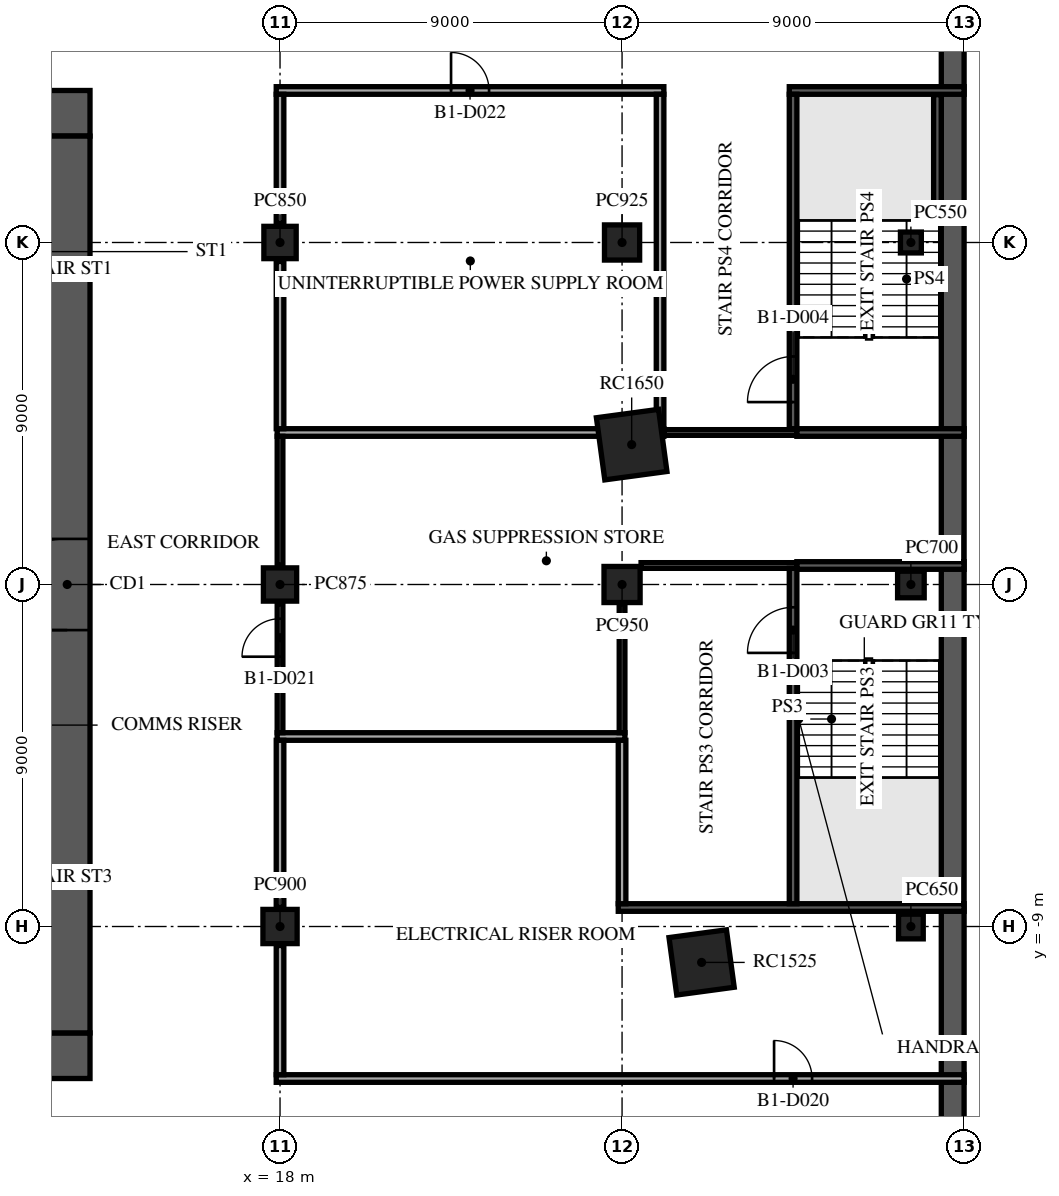
"""IFC4 building model, lengths in metres.
Left out: names, types, materials, properties, quantities, classifications, styles, units other than length and angle.
Written with IfcOpenShell. Run it as: python <this file> out.ifc"""

import sys

from ifc_helpers import new_model, si_unit, direction, frame, frame_2d, origin, origin_2d, place, context, subcontext, project, spatial, rectangle, extrude, element, fill, save


model = new_model("IFC4")
c1 = context("Model", 3, precision=1e-05, world=origin(), true_north=direction((0.0, 1.0)))
c2 = subcontext(c1, "Body", "Model", "MODEL_VIEW")
j1 = project(units=[si_unit("LENGTHUNIT", "METRE"), si_unit("PLANEANGLEUNIT", "RADIAN")], contexts=[c1])
p1 = place(None, origin())
s1 = spatial("IfcSite", under=j1, at=p1, CompositionType="ELEMENT")
p2 = place(p1, origin())
s2 = spatial("IfcBuilding", under=s1, at=p2, CompositionType="ELEMENT")
p3 = place(p2, frame((0.0, 0.0, -4.5)))
s3 = spatial("IfcBuildingStorey", under=s2, at=p3, CompositionType="ELEMENT", Elevation=-4.5)
p4 = place(p3, frame((35.7, -31.0, -0.3), z_axis=(0.0, 0.0, 1.0), x_axis=(0.0, 1.0, 0.0)))
e1 = element("IfcWall", 1, at=p4, inside=s3, PredefinedType="SOLIDWALL", context=c2, shape_type="SweptSolid", body=[
    extrude(rectangle(XDim=62.0, YDim=0.6, at=frame_2d((31.0, 0.0))), origin(), (0.0, 0.0, 1.0), 4.4),
])
p5 = place(p3, frame((18.0, -9.0, 0.0), z_axis=(0.0, 0.0, 1.0), x_axis=(1.0, 0.0, 0.0)))
e2 = element("IfcColumn", 2, at=p5, inside=s3, PredefinedType="COLUMN", context=c2, shape_type="SweptSolid", body=[
    extrude(rectangle(XDim=0.9, YDim=0.9, at=origin_2d()), origin(), (0.0, 0.0, 1.0), 4.5),
])
p6 = place(p3, frame((18.0, 0.0, 0.0), z_axis=(0.0, 0.0, 1.0), x_axis=(1.0, 0.0, 0.0)))
e3 = element("IfcColumn", 3, at=p6, inside=s3, PredefinedType="COLUMN", context=c2, shape_type="SweptSolid", body=[
    extrude(rectangle(XDim=0.875, YDim=0.875, at=origin_2d()), origin(), (0.0, 0.0, 1.0), 4.5),
])
p7 = place(p3, frame((18.0, 9.0, 0.0), z_axis=(0.0, 0.0, 1.0), x_axis=(1.0, 0.0, 0.0)))
e4 = element("IfcColumn", 4, at=p7, inside=s3, PredefinedType="COLUMN", context=c2, shape_type="SweptSolid", body=[
    extrude(rectangle(XDim=0.85, YDim=0.85, at=origin_2d()), origin(), (0.0, 0.0, 1.0), 4.5),
])
p8 = place(p3, frame((27.0, 0.0, 0.0), z_axis=(0.0, 0.0, 1.0), x_axis=(1.0, 0.0, 0.0)))
e5 = element("IfcColumn", 5, at=p8, inside=s3, PredefinedType="COLUMN", context=c2, shape_type="SweptSolid", body=[
    extrude(rectangle(XDim=0.95, YDim=0.95, at=origin_2d()), origin(), (0.0, 0.0, 1.0), 4.5),
])
p9 = place(p3, frame((27.0, 9.0, 0.0), z_axis=(0.0, 0.0, 1.0), x_axis=(1.0, 0.0, 0.0)))
e6 = element("IfcColumn", 6, at=p9, inside=s3, PredefinedType="COLUMN", context=c2, shape_type="SweptSolid", body=[
    extrude(rectangle(XDim=0.925, YDim=0.925, at=origin_2d()), origin(), (0.0, 0.0, 1.0), 4.5),
])
p10 = place(p3, frame((34.6, -9.0, 0.0), z_axis=(0.0, 0.0, 1.0), x_axis=(1.0, 0.0, 0.0)))
e7 = element("IfcColumn", 7, at=p10, inside=s3, PredefinedType="COLUMN", context=c2, shape_type="SweptSolid", body=[
    extrude(rectangle(XDim=0.65, YDim=0.65, at=origin_2d()), origin(), (0.0, 0.0, 1.0), 4.5),
])
p11 = place(p3, frame((34.6, 0.0, 0.0), z_axis=(0.0, 0.0, 1.0), x_axis=(1.0, 0.0, 0.0)))
e8 = element("IfcColumn", 8, at=p11, inside=s3, PredefinedType="COLUMN", context=c2, shape_type="SweptSolid", body=[
    extrude(rectangle(XDim=0.7, YDim=0.7, at=origin_2d()), origin(), (0.0, 0.0, 1.0), 4.5),
])
p12 = place(p3, frame((34.6, 9.0, 0.0), z_axis=(0.0, 0.0, 1.0), x_axis=(1.0, 0.0, 0.0)))
e9 = element("IfcColumn", 9, at=p12, inside=s3, PredefinedType="COLUMN", context=c2, shape_type="SweptSolid", body=[
    extrude(rectangle(XDim=0.55, YDim=0.55, at=origin_2d()), origin(), (0.0, 0.0, 1.0), 4.5),
])
p13 = place(p3, frame((29.093, -9.945, 0.0), z_axis=(0.0, 0.0, 1.0), x_axis=(0.991001197216, 0.133853005627, 0.0)))
e10 = element("IfcColumn", 10, at=p13, inside=s3, PredefinedType="COLUMN", context=c2, shape_type="SweptSolid", body=[
    extrude(rectangle(XDim=1.525, YDim=1.525, at=origin_2d()), origin(), (0.0, 0.0, 1.0), 4.5),
])
p14 = place(p3, frame((27.253, 3.681, 0.0), z_axis=(0.0, 0.0, 1.0), x_axis=(0.991001197216, 0.133853005627, 0.0)))
e11 = element("IfcColumn", 11, at=p14, inside=s3, PredefinedType="COLUMN", context=c2, shape_type="SweptSolid", body=[
    extrude(rectangle(XDim=1.65, YDim=1.65, at=origin_2d()), origin(), (0.0, 0.0, 1.0), 4.5),
])
p15 = place(p3, frame((-13.0, 12.4, 0.0), z_axis=(0.0, 0.0, 1.0), x_axis=(1.0, 0.0, 0.0)))
e12 = element("IfcWall", 12, at=p15, inside=s3, PredefinedType="SHEAR", context=c2, shape_type="SweptSolid", body=[
    extrude(rectangle(XDim=26.0, YDim=1.2, at=frame_2d((13.0, 0.0))), origin(), (0.0, 0.0, 1.0), 4.1),
])
p16 = place(p15, frame((11.8, 0.0, 0.0)))
e13 = element("IfcOpeningElement", 13, at=p16, cuts=e12, PredefinedType="OPENING", context=c2, shape_type="SweptSolid", body=[
    extrude(rectangle(XDim=2.4, YDim=2.4, at=frame_2d((1.2, 1.2))), frame((0.0, 0.61, 0.0), z_axis=(0.0, -1.0, 0.0), x_axis=(1.0, 0.0, 0.0)), (0.0, 0.0, 1.0), 1.22),
])
p17 = place(p15, frame((22.625, 0.0, 0.0)))
e14 = element("IfcOpeningElement", 14, at=p17, cuts=e12, PredefinedType="OPENING", context=c2, shape_type="SweptSolid", body=[
    extrude(rectangle(XDim=1.2, YDim=2.1, at=frame_2d((0.6, 1.05))), frame((0.0, 0.61, 0.0), z_axis=(0.0, -1.0, 0.0), x_axis=(1.0, 0.0, 0.0)), (0.0, 0.0, 1.0), 1.22),
])
p18 = place(p15, frame((1.6, 0.0, 0.0)))
e15 = element("IfcOpeningElement", 15, at=p18, cuts=e12, PredefinedType="OPENING", context=c2, shape_type="SweptSolid", body=[
    extrude(rectangle(XDim=1.0, YDim=2.1, at=frame_2d((0.5, 1.05))), frame((0.0, 0.61, 0.0), z_axis=(0.0, -1.0, 0.0), x_axis=(1.0, 0.0, 0.0)), (0.0, 0.0, 1.0), 1.22),
])
p19 = place(p3, frame((-13.0, -12.4, 0.0), z_axis=(0.0, 0.0, 1.0), x_axis=(1.0, 0.0, 0.0)))
e16 = element("IfcWall", 16, at=p19, inside=s3, PredefinedType="SHEAR", context=c2, shape_type="SweptSolid", body=[
    extrude(rectangle(XDim=26.0, YDim=1.2, at=frame_2d((13.0, 0.0))), origin(), (0.0, 0.0, 1.0), 4.1),
])
p20 = place(p19, frame((7.9, 0.0, 0.0)))
e17 = element("IfcOpeningElement", 17, at=p20, cuts=e16, PredefinedType="OPENING", context=c2, shape_type="SweptSolid", body=[
    extrude(rectangle(XDim=2.0, YDim=2.1, at=frame_2d((1.0, 1.05))), frame((0.0, 0.61, 0.0), z_axis=(0.0, -1.0, 0.0), x_axis=(1.0, 0.0, 0.0)), (0.0, 0.0, 1.0), 1.22),
])
p21 = place(p19, frame((18.025, 0.0, 0.0)))
e18 = element("IfcOpeningElement", 18, at=p21, cuts=e16, PredefinedType="OPENING", context=c2, shape_type="SweptSolid", body=[
    extrude(rectangle(XDim=1.2, YDim=2.1, at=frame_2d((0.6, 1.05))), frame((0.0, 0.61, 0.0), z_axis=(0.0, -1.0, 0.0), x_axis=(1.0, 0.0, 0.0)), (0.0, 0.0, 1.0), 1.22),
])
p22 = place(p19, frame((2.175, 0.0, 0.0)))
e19 = element("IfcOpeningElement", 19, at=p22, cuts=e16, PredefinedType="OPENING", context=c2, shape_type="SweptSolid", body=[
    extrude(rectangle(XDim=1.2, YDim=2.1, at=frame_2d((0.6, 1.05))), frame((0.0, 0.61, 0.0), z_axis=(0.0, -1.0, 0.0), x_axis=(1.0, 0.0, 0.0)), (0.0, 0.0, 1.0), 1.22),
])
p23 = place(p19, frame((22.625, 0.0, 0.0)))
e20 = element("IfcOpeningElement", 20, at=p23, cuts=e16, PredefinedType="OPENING", context=c2, shape_type="SweptSolid", body=[
    extrude(rectangle(XDim=1.2, YDim=2.1, at=frame_2d((0.6, 1.05))), frame((0.0, 0.61, 0.0), z_axis=(0.0, -1.0, 0.0), x_axis=(1.0, 0.0, 0.0)), (0.0, 0.0, 1.0), 1.22),
])
p24 = place(p3, frame((12.4, -11.8, 0.0), z_axis=(0.0, 0.0, 1.0), x_axis=(0.0, 1.0, 0.0)))
e21 = element("IfcWall", 21, at=p24, inside=s3, PredefinedType="SHEAR", context=c2, shape_type="SweptSolid", body=[
    extrude(rectangle(XDim=23.6, YDim=1.2, at=frame_2d((11.8, 0.0))), origin(), (0.0, 0.0, 1.0), 4.1),
])
p25 = place(p24, frame((10.6, 0.0, 0.0)))
e22 = element("IfcOpeningElement", 22, at=p25, cuts=e21, PredefinedType="OPENING", context=c2, shape_type="SweptSolid", body=[
    extrude(rectangle(XDim=2.4, YDim=2.4, at=frame_2d((1.2, 1.2))), frame((0.0, 0.61, 0.0), z_axis=(0.0, -1.0, 0.0), x_axis=(1.0, 0.0, 0.0)), (0.0, 0.0, 1.0), 1.22),
])
p26 = place(p3, frame((17.9, -13.0, 0.0), z_axis=(0.0, 0.0, 1.0), x_axis=(1.0, 0.0, 0.0)))
e23 = element("IfcWall", 23, at=p26, inside=s3, PredefinedType="PARTITIONING", context=c2, shape_type="SweptSolid", body=[
    extrude(rectangle(XDim=18.1, YDim=0.2, at=frame_2d((9.05, 0.0))), origin(), (0.0, 0.0, 1.0), 4.1),
])
p27 = place(p26, frame((13.1, 0.0, 0.0)))
e24 = element("IfcOpeningElement", 24, at=p27, cuts=e23, PredefinedType="OPENING", context=c2, shape_type="SweptSolid", body=[
    extrude(rectangle(XDim=1.0, YDim=2.1, at=frame_2d((0.5, 1.05))), frame((0.0, 0.11, 0.0), z_axis=(0.0, -1.0, 0.0), x_axis=(1.0, 0.0, 0.0)), (0.0, 0.0, 1.0), 0.22),
])
p28 = place(p3, frame((26.9, -8.5, 0.0), z_axis=(0.0, 0.0, 1.0), x_axis=(1.0, 0.0, 0.0)))
e25 = element("IfcWall", 25, at=p28, inside=s3, PredefinedType="PARTITIONING", context=c2, shape_type="SweptSolid", body=[
    extrude(rectangle(XDim=9.1, YDim=0.2, at=frame_2d((4.55, 0.0))), origin(), (0.0, 0.0, 1.0), 4.1),
])
p29 = place(p3, frame((17.925, -4.0, 0.0), z_axis=(0.0, 0.0, 1.0), x_axis=(1.0, 0.0, 0.0)))
e26 = element("IfcWall", 26, at=p29, inside=s3, PredefinedType="PARTITIONING", context=c2, shape_type="SweptSolid", body=[
    extrude(rectangle(XDim=9.15, YDim=0.2, at=frame_2d((4.575, 0.0))), origin(), (0.0, 0.0, 1.0), 4.1),
])
p30 = place(p3, frame((27.5, 0.5, 0.0), z_axis=(0.0, 0.0, 1.0), x_axis=(1.0, 0.0, 0.0)))
e27 = element("IfcWall", 27, at=p30, inside=s3, PredefinedType="PARTITIONING", context=c2, shape_type="SweptSolid", body=[
    extrude(rectangle(XDim=4.1, YDim=0.15, at=frame_2d((2.05, 0.0))), origin(), (0.0, 0.0, 1.0), 4.1),
])
p31 = place(p3, frame((31.6, 0.5, 0.0), z_axis=(0.0, 0.0, 1.0), x_axis=(1.0, 0.0, 0.0)))
e28 = element("IfcWall", 28, at=p31, inside=s3, PredefinedType="PARTITIONING", context=c2, shape_type="SweptSolid", body=[
    extrude(rectangle(XDim=4.4, YDim=0.2, at=frame_2d((2.2, 0.0))), origin(), (0.0, 0.0, 1.0), 4.1),
])
p32 = place(p3, frame((17.925, 4.0, 0.0), z_axis=(0.0, 0.0, 1.0), x_axis=(1.0, 0.0, 0.0)))
e29 = element("IfcWall", 29, at=p32, inside=s3, PredefinedType="PARTITIONING", context=c2, shape_type="SweptSolid", body=[
    extrude(rectangle(XDim=8.597, YDim=0.2, at=frame_2d((4.298, 0.0))), origin(), (0.0, 0.0, 1.0), 4.1),
])
p33 = place(p3, frame((27.984, 4.0, 0.0), z_axis=(0.0, 0.0, 1.0), x_axis=(1.0, 0.0, 0.0)))
e30 = element("IfcWall", 30, at=p33, inside=s3, PredefinedType="PARTITIONING", context=c2, shape_type="SweptSolid", body=[
    extrude(rectangle(XDim=0.116, YDim=0.2, at=frame_2d((0.058, 0.0))), origin(), (0.0, 0.0, 1.0), 4.1),
])
p34 = place(p3, frame((28.1, 4.0, 0.0), z_axis=(0.0, 0.0, 1.0), x_axis=(1.0, 0.0, 0.0)))
e31 = element("IfcWall", 31, at=p34, inside=s3, PredefinedType="PARTITIONING", context=c2, shape_type="SweptSolid", body=[
    extrude(rectangle(XDim=3.5, YDim=0.15, at=frame_2d((1.75, 0.0))), origin(), (0.0, 0.0, 1.0), 4.1),
])
p35 = place(p3, frame((31.6, 4.0, 0.0), z_axis=(0.0, 0.0, 1.0), x_axis=(1.0, 0.0, 0.0)))
e32 = element("IfcWall", 32, at=p35, inside=s3, PredefinedType="PARTITIONING", context=c2, shape_type="SweptSolid", body=[
    extrude(rectangle(XDim=4.4, YDim=0.2, at=frame_2d((2.2, 0.0))), origin(), (0.0, 0.0, 1.0), 4.1),
])
p36 = place(p3, frame((17.9, 13.0, 0.0), z_axis=(0.0, 0.0, 1.0), x_axis=(1.0, 0.0, 0.0)))
e33 = element("IfcWall", 33, at=p36, inside=s3, PredefinedType="PARTITIONING", context=c2, shape_type="SweptSolid", body=[
    extrude(rectangle(XDim=10.2, YDim=0.2, at=frame_2d((5.1, 0.0))), origin(), (0.0, 0.0, 1.0), 4.1),
])
p37 = place(p36, frame((4.6, 0.0, 0.0)))
e34 = element("IfcOpeningElement", 34, at=p37, cuts=e33, PredefinedType="OPENING", context=c2, shape_type="SweptSolid", body=[
    extrude(rectangle(XDim=1.0, YDim=2.1, at=frame_2d((0.5, 1.05))), frame((0.0, 0.11, 0.0), z_axis=(0.0, -1.0, 0.0), x_axis=(1.0, 0.0, 0.0)), (0.0, 0.0, 1.0), 0.22),
])
p38 = place(p3, frame((31.4, 13.0, 0.0), z_axis=(0.0, 0.0, 1.0), x_axis=(1.0, 0.0, 0.0)))
e35 = element("IfcWall", 35, at=p38, inside=s3, PredefinedType="PARTITIONING", context=c2, shape_type="SweptSolid", body=[
    extrude(rectangle(XDim=4.6, YDim=0.2, at=frame_2d((2.3, 0.0))), origin(), (0.0, 0.0, 1.0), 4.1),
])
p39 = place(p3, frame((18.0, -12.9, 0.0), z_axis=(0.0, 0.0, 1.0), x_axis=(0.0, 1.0, 0.0)))
e36 = element("IfcWall", 36, at=p39, inside=s3, PredefinedType="PARTITIONING", context=c2, shape_type="SweptSolid", body=[
    extrude(rectangle(XDim=3.4, YDim=0.2, at=frame_2d((1.7, 0.0))), origin(), (0.0, 0.0, 1.0), 4.1),
])
p40 = place(p3, frame((18.0, -8.5, 0.0), z_axis=(0.0, 0.0, 1.0), x_axis=(0.0, 1.0, 0.0)))
e37 = element("IfcWall", 37, at=p40, inside=s3, PredefinedType="PARTITIONING", context=c2, shape_type="SweptSolid", body=[
    extrude(rectangle(XDim=4.4, YDim=0.2, at=frame_2d((2.2, 0.0))), origin(), (0.0, 0.0, 1.0), 4.1),
])
p41 = place(p3, frame((18.0, -3.9, 0.0), z_axis=(0.0, 0.0, 1.0), x_axis=(0.0, 1.0, 0.0)))
e38 = element("IfcWall", 38, at=p41, inside=s3, PredefinedType="PARTITIONING", context=c2, shape_type="SweptSolid", body=[
    extrude(rectangle(XDim=3.4, YDim=0.15, at=frame_2d((1.7, 0.0))), origin(), (0.0, 0.0, 1.0), 4.1),
])
p42 = place(p41, frame((2.0, 0.0, 0.0)))
e39 = element("IfcOpeningElement", 39, at=p42, cuts=e38, PredefinedType="OPENING", context=c2, shape_type="SweptSolid", body=[
    extrude(rectangle(XDim=1.0, YDim=2.1, at=frame_2d((0.5, 1.05))), frame((0.0, 0.085, 0.0), z_axis=(0.0, -1.0, 0.0), x_axis=(1.0, 0.0, 0.0)), (0.0, 0.0, 1.0), 0.17),
])
p43 = place(p3, frame((18.0, 0.5, 0.0), z_axis=(0.0, 0.0, 1.0), x_axis=(0.0, 1.0, 0.0)))
e40 = element("IfcWall", 40, at=p43, inside=s3, PredefinedType="PARTITIONING", context=c2, shape_type="SweptSolid", body=[
    extrude(rectangle(XDim=3.4, YDim=0.15, at=frame_2d((1.7, 0.0))), origin(), (0.0, 0.0, 1.0), 4.1),
])
p44 = place(p3, frame((18.0, 4.1, 0.0), z_axis=(0.0, 0.0, 1.0), x_axis=(0.0, 1.0, 0.0)))
e41 = element("IfcWall", 41, at=p44, inside=s3, PredefinedType="PARTITIONING", context=c2, shape_type="SweptSolid", body=[
    extrude(rectangle(XDim=4.4, YDim=0.2, at=frame_2d((2.2, 0.0))), origin(), (0.0, 0.0, 1.0), 4.1),
])
p45 = place(p3, frame((18.0, 9.5, 0.0), z_axis=(0.0, 0.0, 1.0), x_axis=(0.0, 1.0, 0.0)))
e42 = element("IfcWall", 42, at=p45, inside=s3, PredefinedType="PARTITIONING", context=c2, shape_type="SweptSolid", body=[
    extrude(rectangle(XDim=3.4, YDim=0.2, at=frame_2d((1.7, 0.0))), origin(), (0.0, 0.0, 1.0), 4.1),
])
p46 = place(p3, frame((27.0, -8.4, 0.0), z_axis=(0.0, 0.0, 1.0), x_axis=(0.0, 1.0, 0.0)))
e43 = element("IfcWall", 43, at=p46, inside=s3, PredefinedType="PARTITIONING", context=c2, shape_type="SweptSolid", body=[
    extrude(rectangle(XDim=4.3, YDim=0.2, at=frame_2d((2.15, 0.0))), origin(), (0.0, 0.0, 1.0), 4.1),
])
p47 = place(p3, frame((27.0, -3.9, 0.0), z_axis=(0.0, 0.0, 1.0), x_axis=(0.0, 1.0, 0.0)))
e44 = element("IfcWall", 44, at=p47, inside=s3, PredefinedType="PARTITIONING", context=c2, shape_type="SweptSolid", body=[
    extrude(rectangle(XDim=3.4, YDim=0.15, at=frame_2d((1.7, 0.0))), origin(), (0.0, 0.0, 1.0), 4.1),
])
p48 = place(p3, frame((28.0, 4.1, 0.0), z_axis=(0.0, 0.0, 1.0), x_axis=(0.0, 1.0, 0.0)))
e45 = element("IfcWall", 45, at=p48, inside=s3, PredefinedType="PARTITIONING", context=c2, shape_type="SweptSolid", body=[
    extrude(rectangle(XDim=8.8, YDim=0.2, at=frame_2d((4.4, 0.0))), origin(), (0.0, 0.0, 1.0), 4.1),
])
p49 = place(p3, frame((31.5, -8.4, 0.0), z_axis=(0.0, 0.0, 1.0), x_axis=(0.0, 1.0, 0.0)))
e46 = element("IfcWall", 46, at=p49, inside=s3, PredefinedType="PARTITIONING", context=c2, shape_type="SweptSolid", body=[
    extrude(rectangle(XDim=8.825, YDim=0.2, at=frame_2d((4.413, 0.0))), origin(), (0.0, 0.0, 1.0), 4.1),
])
p50 = place(p49, frame((6.6, 0.0, 0.0)))
e47 = element("IfcOpeningElement", 47, at=p50, cuts=e46, PredefinedType="OPENING", context=c2, shape_type="SweptSolid", body=[
    extrude(rectangle(XDim=1.2, YDim=2.1, at=frame_2d((0.6, 1.05))), frame((0.0, 0.11, 0.0), z_axis=(0.0, -1.0, 0.0), x_axis=(1.0, 0.0, 0.0)), (0.0, 0.0, 1.0), 0.22),
])
p51 = place(p3, frame((31.5, 4.1, 0.0), z_axis=(0.0, 0.0, 1.0), x_axis=(0.0, 1.0, 0.0)))
e48 = element("IfcWall", 48, at=p51, inside=s3, PredefinedType="PARTITIONING", context=c2, shape_type="SweptSolid", body=[
    extrude(rectangle(XDim=8.8, YDim=0.2, at=frame_2d((4.4, 0.0))), origin(), (0.0, 0.0, 1.0), 4.1),
])
p52 = place(p51, frame((0.7, 0.0, 0.0)))
e49 = element("IfcOpeningElement", 49, at=p52, cuts=e48, PredefinedType="OPENING", context=c2, shape_type="SweptSolid", body=[
    extrude(rectangle(XDim=1.2, YDim=2.1, at=frame_2d((0.6, 1.05))), frame((0.0, 0.11, 0.0), z_axis=(0.0, -1.0, 0.0), x_axis=(1.0, 0.0, 0.0)), (0.0, 0.0, 1.0), 0.22),
])
p53 = place(p3, frame((35.298, 9.581, 0.0), z_axis=(0.0, 0.0, 1.0), x_axis=(0.0, 1.0, 0.0)))
e50 = element("IfcWall", 50, at=p53, inside=s3, PredefinedType="PARTITIONING", context=c2, shape_type="SweptSolid", body=[
    extrude(rectangle(XDim=3.309, YDim=0.2, at=frame_2d((1.655, 0.0))), origin(), (0.0, 0.0, 1.0), 4.1),
])
p54 = place(p25, origin())
e51 = element("IfcDoor", 51, at=p54, inside=s3, OperationType="SINGLE_SWING_LEFT", PredefinedType="DOOR", context=c2, shape_type="SweptSolid", body=[
    extrude(rectangle(XDim=2.4, YDim=2.4, at=frame_2d((1.2, 1.2))), frame((0.0, 0.025, 0.0), z_axis=(0.0, -1.0, 0.0), x_axis=(1.0, 0.0, 0.0)), (0.0, 0.0, 1.0), 0.05),
])
fill(e22, e51)
p55 = place(p50, frame((1.2, 0.0, 0.0), z_axis=(0.0, 0.0, 1.0), x_axis=(-1.0, 0.0, 0.0)))
e52 = element("IfcDoor", 52, at=p55, inside=s3, OperationType="SINGLE_SWING_LEFT", PredefinedType="DOOR", context=c2, shape_type="SweptSolid", body=[
    extrude(rectangle(XDim=1.2, YDim=2.1, at=frame_2d((0.6, 1.05))), frame((0.0, 0.025, 0.0), z_axis=(0.0, -1.0, 0.0), x_axis=(1.0, 0.0, 0.0)), (0.0, 0.0, 1.0), 0.05),
])
fill(e47, e52)
p56 = place(p52, frame((1.2, 0.0, 0.0), z_axis=(0.0, 0.0, 1.0), x_axis=(-1.0, 0.0, 0.0)))
e53 = element("IfcDoor", 53, at=p56, inside=s3, OperationType="SINGLE_SWING_RIGHT", PredefinedType="DOOR", context=c2, shape_type="SweptSolid", body=[
    extrude(rectangle(XDim=1.2, YDim=2.1, at=frame_2d((0.6, 1.05))), frame((0.0, 0.025, 0.0), z_axis=(0.0, -1.0, 0.0), x_axis=(1.0, 0.0, 0.0)), (0.0, 0.0, 1.0), 0.05),
])
fill(e49, e53)
p57 = place(p27, origin())
e54 = element("IfcDoor", 54, at=p57, inside=s3, OperationType="SINGLE_SWING_RIGHT", PredefinedType="DOOR", context=c2, shape_type="SweptSolid", body=[
    extrude(rectangle(XDim=1.0, YDim=2.1, at=frame_2d((0.5, 1.05))), frame((0.0, 0.025, 0.0), z_axis=(0.0, -1.0, 0.0), x_axis=(1.0, 0.0, 0.0)), (0.0, 0.0, 1.0), 0.05),
])
fill(e24, e54)
p58 = place(p42, origin())
e55 = element("IfcDoor", 55, at=p58, inside=s3, OperationType="SINGLE_SWING_LEFT", PredefinedType="DOOR", context=c2, shape_type="SweptSolid", body=[
    extrude(rectangle(XDim=1.0, YDim=2.1, at=frame_2d((0.5, 1.05))), frame((0.0, 0.025, 0.0), z_axis=(0.0, -1.0, 0.0), x_axis=(1.0, 0.0, 0.0)), (0.0, 0.0, 1.0), 0.05),
])
fill(e39, e55)
p59 = place(p37, origin())
e56 = element("IfcDoor", 56, at=p59, inside=s3, OperationType="SINGLE_SWING_RIGHT", PredefinedType="DOOR", context=c2, shape_type="SweptSolid", body=[
    extrude(rectangle(XDim=1.0, YDim=2.1, at=frame_2d((0.5, 1.05))), frame((0.0, 0.025, 0.0), z_axis=(0.0, -1.0, 0.0), x_axis=(1.0, 0.0, 0.0)), (0.0, 0.0, 1.0), 0.05),
])
fill(e34, e56)
save(model, sys.argv[1])
